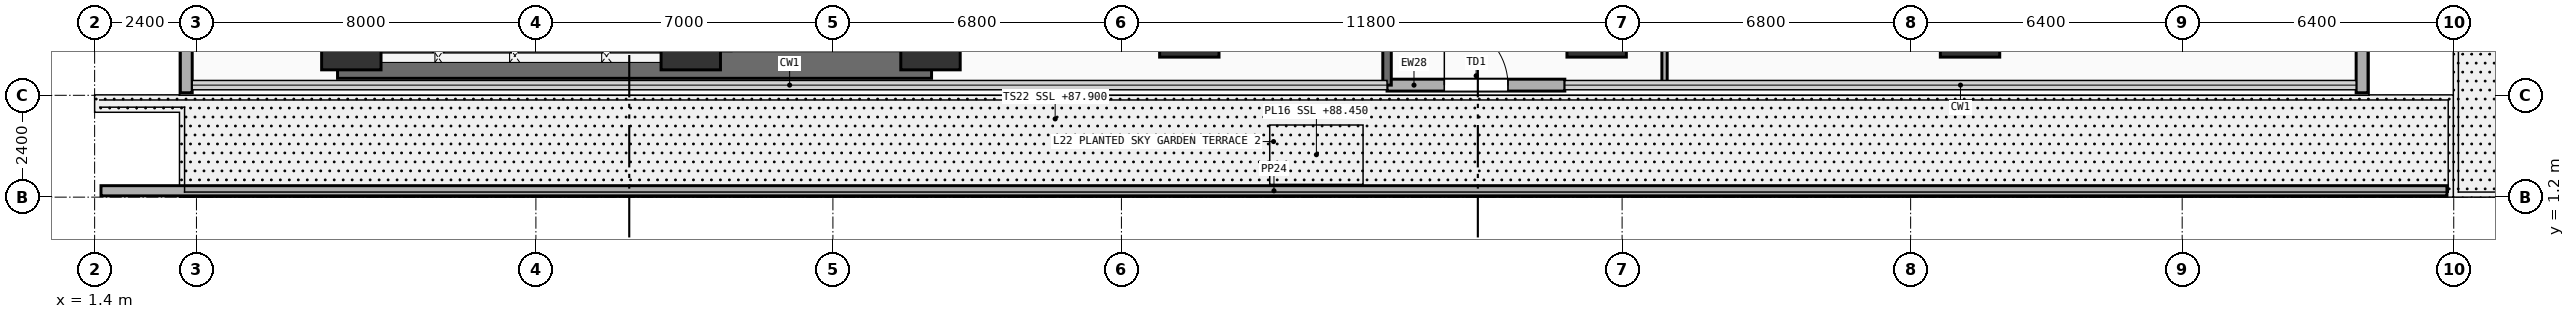
"""IFC4 building model, lengths in metres.
Left out: names, types, materials, properties, quantities, classifications, styles, units other than length and angle.
Written with IfcOpenShell. Run it as: python <this file> out.ifc"""

import sys

from ifc_helpers import new_model, si_unit, direction, frame, frame_2d, origin, origin_2d, place, context, subcontext, project, spatial, rectangle, extrude, element, fill, save


model = new_model("IFC4")
c1 = context("Model", 3, precision=1e-05, world=origin(), true_north=direction((0.0, 1.0)))
c2 = subcontext(c1, "Body", "Model", "MODEL_VIEW")
j1 = project(units=[si_unit("LENGTHUNIT", "METRE"), si_unit("PLANEANGLEUNIT", "RADIAN")], contexts=[c1])
p1 = place(None, origin())
s1 = spatial("IfcSite", under=j1, at=p1, CompositionType="ELEMENT")
p2 = place(p1, origin())
s2 = spatial("IfcBuilding", under=s1, at=p2, CompositionType="ELEMENT")
p3 = place(p2, frame((0.0, 0.0, 87.9)))
s3 = spatial("IfcBuildingStorey", under=s2, at=p3, CompositionType="ELEMENT", Elevation=87.9)
p4 = place(p3, frame((7.125, 4.325, 0.0), z_axis=(0.0, 0.0, 1.0), x_axis=(1.0, 0.0, 0.0)))
e1 = element("IfcWall", 1, at=p4, inside=s3, PredefinedType="SHEAR", context=c2, shape_type="SweptSolid", body=[
    extrude(rectangle(XDim=14.0, YDim=0.65, at=frame_2d((7.0, 0.0))), origin(), (0.0, 0.0, 1.0), 3.54),
])
for number, where, z_axis, x_axis in (
    (2, (7.45, 4.9, 0.0), (0.0, 0.0, 1.0), (1.0, 0.0, 0.0)),
    (3, (15.45, 4.9, 0.0), (0.0, 0.0, 1.0), (1.0, 0.0, 0.0)),
    (4, (21.1, 4.9, 0.0), (0.0, 0.0, 1.0), (1.0, 0.0, 0.0)),
    (5, (27.2, 5.2, 0.0), (0.0, 0.0, 1.0), (1.0, 0.0, 0.0)),
    (6, (36.8, 5.2, 0.0), (0.0, 0.0, 1.0), (1.0, 0.0, 0.0)),
    (7, (45.6, 5.2, 0.0), (0.0, 0.0, 1.0), (1.0, 0.0, 0.0)),
):
    element("IfcColumn", number, at=place(p3, frame(where, z_axis=z_axis, x_axis=x_axis)), inside=s3, PredefinedType="COLUMN", context=c2, shape_type="SweptSolid", body=[
        extrude(rectangle(XDim=1.4, YDim=1.4, at=origin_2d()), origin(), (0.0, 0.0, 1.0), 3.54),
    ])
p5 = place(p3, frame((31.86, 3.84, 0.0), z_axis=(0.0, 0.0, 1.0), x_axis=(1.0, 0.0, 0.0)))
e8 = element("IfcWall", 8, at=p5, inside=s3, PredefinedType="SOLIDWALL", context=c2, shape_type="SweptSolid", body=[
    extrude(rectangle(XDim=4.19, YDim=0.28, at=frame_2d((2.095, 0.0))), origin(), (0.0, 0.0, 1.0), 3.54),
])
p6 = place(p5, frame((1.35, 0.0, 0.0)))
e9 = element("IfcOpeningElement", 9, at=p6, cuts=e8, PredefinedType="OPENING", context=c2, shape_type="SweptSolid", body=[
    extrude(rectangle(XDim=1.5, YDim=2.25, at=frame_2d((0.75, 1.125))), frame((0.0, 0.15, 0.0), z_axis=(0.0, -1.0, 0.0), x_axis=(1.0, 0.0, 0.0)), (0.0, 0.0, 1.0), 0.3),
])
p7 = place(p3, frame((1.55, 1.35, 0.0), z_axis=(0.0, 0.0, 1.0), x_axis=(1.0, 0.0, 0.0)))
e10 = element("IfcWall", 10, at=p7, inside=s3, PredefinedType="PARAPET", context=c2, shape_type="SweptSolid", body=[
    extrude(rectangle(XDim=55.29, YDim=0.24, at=frame_2d((27.645, 0.0))), origin(), (0.0, 0.0, 1.0), 0.42),
])
for number, where, z_axis, x_axis in (
    (11, (3.56, 3.66, 0.0), (0.0, 0.0, 1.0), (0.0, 1.0, 0.0)),
    (12, (54.84, 3.66, 0.0), (0.0, 0.0, 1.0), (0.0, 1.0, 0.0)),
):
    element("IfcWall", number, at=place(p3, frame(where, z_axis=z_axis, x_axis=x_axis)), inside=s3, PredefinedType="SOLIDWALL", context=c2, shape_type="SweptSolid", body=[
        extrude(rectangle(XDim=2.24, YDim=0.28, at=frame_2d((1.12, 0.0))), origin(), (0.0, 0.0, 1.0), 3.54),
    ])
p8 = place(p3, frame((31.86, 3.84, 0.0), z_axis=(0.0, 0.0, 1.0), x_axis=(0.0, 1.0, 0.0)))
e13 = element("IfcWall", 13, at=p8, inside=s3, PredefinedType="SHEAR", context=c2, shape_type="SweptSolid", body=[
    extrude(rectangle(XDim=11.41, YDim=0.2, at=frame_2d((5.705, 0.0))), origin(), (0.0, 0.0, 1.0), 3.54),
])
for number, where, z_axis, x_axis in (
    (14, (9.5, 4.45, 0.0), (0.0, 0.0, 1.0), (0.0, 1.0, 0.0)),
    (15, (11.36, 4.45, 0.0), (0.0, 0.0, 1.0), (0.0, 1.0, 0.0)),
    (16, (13.46, 4.45, 0.0), (0.0, 0.0, 1.0), (0.0, 1.0, 0.0)),
):
    element("IfcWall", number, at=place(p3, frame(where, z_axis=z_axis, x_axis=x_axis)), inside=s3, PredefinedType="PARTITIONING", context=c2, shape_type="SweptSolid", body=[
        extrude(rectangle(XDim=2.8, YDim=0.2, at=frame_2d((1.4, 0.0))), origin(), (0.0, 0.0, 1.0), 3.54),
    ])
p9 = place(p3, frame((38.4, 3.84, 0.0), z_axis=(0.0, 0.0, 1.0), x_axis=(0.0, 1.0, 0.0)))
e17 = element("IfcWall", 17, at=p9, inside=s3, PredefinedType="PARTITIONING", context=c2, shape_type="SweptSolid", body=[
    extrude(rectangle(XDim=20.12, YDim=0.125, at=frame_2d((10.06, 0.0))), origin(), (0.0, 0.0, 1.0), 3.54),
])
p10 = place(p9, frame((11.81, 0.0, 0.0)))
e18 = element("IfcOpeningElement", 18, at=p10, cuts=e17, PredefinedType="OPENING", context=c2, shape_type="SweptSolid", body=[
    extrude(rectangle(XDim=1.0, YDim=2.2, at=frame_2d((0.5, 1.1))), frame((0.0, 0.073, 0.0), z_axis=(0.0, -1.0, 0.0), x_axis=(1.0, 0.0, 0.0)), (0.0, 0.0, 1.0), 0.145),
])
p11 = place(p6, frame((1.5, 0.0, 0.0), z_axis=(0.0, 0.0, 1.0), x_axis=(-1.0, 0.0, 0.0)))
e19 = element("IfcDoor", 19, at=p11, inside=s3, OperationType="SINGLE_SWING_RIGHT", PredefinedType="DOOR", context=c2, shape_type="SweptSolid", body=[
    extrude(rectangle(XDim=1.5, YDim=2.25, at=frame_2d((0.75, 1.125))), frame((0.0, 0.025, 0.0), z_axis=(0.0, -1.0, 0.0), x_axis=(1.0, 0.0, 0.0)), (0.0, 0.0, 1.0), 0.05),
])
fill(e9, e19)
save(model, sys.argv[1])
